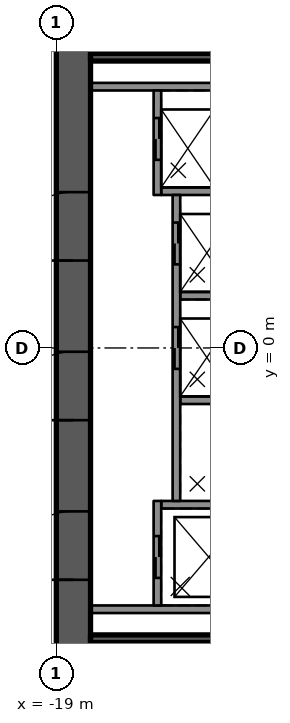
"""IFC4 building model, lengths in metres.
Left out: names, types, materials, properties, quantities, classifications, styles, units other than length and angle.
Written with IfcOpenShell. Run it as: python <this file> out.ifc"""

import sys

from ifc_helpers import new_model, si_unit, direction, frame, frame_2d, origin, place, context, subcontext, project, spatial, rectangle, extrude, element, fill, save


model = new_model("IFC4")
c1 = context("Model", 3, precision=1e-05, world=origin(), true_north=direction((0.0, 1.0)))
c2 = subcontext(c1, "Body", "Model", "MODEL_VIEW")
j1 = project(units=[si_unit("LENGTHUNIT", "METRE"), si_unit("PLANEANGLEUNIT", "RADIAN")], contexts=[c1])
p1 = place(None, origin())
s1 = spatial("IfcSite", under=j1, at=p1, CompositionType="ELEMENT")
p2 = place(p1, origin())
s2 = spatial("IfcBuilding", under=s1, at=p2, CompositionType="ELEMENT")
p3 = place(p2, frame((0.0, 0.0, 76.3)))
s3 = spatial("IfcBuildingStorey", under=s2, at=p3, CompositionType="ELEMENT", Elevation=76.3)
p4 = place(p3, frame((-18.55, -12.0, 0.0), z_axis=(0.0, 0.0, 1.0), x_axis=(0.0, 1.0, 0.0)))
e1 = element("IfcWall", 1, at=p4, inside=s3, PredefinedType="SHEAR", context=c2, shape_type="SweptSolid", body=[
    extrude(rectangle(XDim=24.0, YDim=0.9, at=frame_2d((12.0, 0.0))), origin(), (0.0, 0.0, 1.0), 4.4),
])
p5 = place(p4, frame((5.9, 0.0, 0.0)))
e2 = element("IfcOpeningElement", 2, at=p5, cuts=e1, PredefinedType="OPENING", context=c2, shape_type="SweptSolid", body=[
    extrude(rectangle(XDim=1.8, YDim=2.1, at=frame_2d((0.9, 1.05))), frame((0.0, 0.46, 0.0), z_axis=(0.0, -1.0, 0.0), x_axis=(1.0, 0.0, 0.0)), (0.0, 0.0, 1.0), 0.92),
])
p6 = place(p4, frame((10.1, 0.0, 0.0)))
e3 = element("IfcOpeningElement", 3, at=p6, cuts=e1, PredefinedType="OPENING", context=c2, shape_type="SweptSolid", body=[
    extrude(rectangle(XDim=1.8, YDim=2.1, at=frame_2d((0.9, 1.05))), frame((0.0, 0.46, 0.0), z_axis=(0.0, -1.0, 0.0), x_axis=(1.0, 0.0, 0.0)), (0.0, 0.0, 1.0), 0.92),
])
p7 = place(p4, frame((14.3, 0.0, 0.0)))
e4 = element("IfcOpeningElement", 4, at=p7, cuts=e1, PredefinedType="OPENING", context=c2, shape_type="SweptSolid", body=[
    extrude(rectangle(XDim=1.8, YDim=2.1, at=frame_2d((0.9, 1.05))), frame((0.0, 0.46, 0.0), z_axis=(0.0, -1.0, 0.0), x_axis=(1.0, 0.0, 0.0)), (0.0, 0.0, 1.0), 0.92),
])
for number, where, z_axis, x_axis in (
    (5, (-11.54, 6.875, 0.0), (0.0, 0.0, 1.0), (-1.0, 0.0, 0.0)),
    (6, (-11.54, -6.875, 0.0), (0.0, 0.0, 1.0), (-1.0, 0.0, 0.0)),
):
    element("IfcWall", number, at=place(p3, frame(where, z_axis=z_axis, x_axis=x_axis)), inside=s3, PredefinedType="SOLIDWALL", context=c2, shape_type="SweptSolid", body=[
        extrude(rectangle(XDim=6.56, YDim=0.2, at=frame_2d((3.28, 0.0))), origin(), (0.0, 0.0, 1.0), 3.99),
    ])
p8 = place(p3, frame((-11.54, -4.125, 0.0), z_axis=(0.0, 0.0, 1.0), x_axis=(-1.0, 0.0, 0.0)))
e7 = element("IfcWall", 7, at=p8, inside=s3, PredefinedType="SOLIDWALL", context=c2, shape_type="SweptSolid", body=[
    extrude(rectangle(XDim=4.7, YDim=0.2, at=frame_2d((2.35, 0.0))), origin(), (0.0, 0.0, 1.0), 3.99),
])
for number, where, z_axis, x_axis in (
    (8, (-11.54, -1.375, 0.0), (0.0, 0.0, 1.0), (-1.0, 0.0, 0.0)),
    (9, (-11.54, 1.375, 0.0), (0.0, 0.0, 1.0), (-1.0, 0.0, 0.0)),
):
    element("IfcWall", number, at=place(p3, frame(where, z_axis=z_axis, x_axis=x_axis)), inside=s3, PredefinedType="SOLIDWALL", context=c2, shape_type="SweptSolid", body=[
        extrude(rectangle(XDim=4.2, YDim=0.2, at=frame_2d((2.1, 0.0))), origin(), (0.0, 0.0, 1.0), 3.99),
    ])
p9 = place(p3, frame((-11.54, 4.125, 0.0), z_axis=(0.0, 0.0, 1.0), x_axis=(-1.0, 0.0, 0.0)))
e10 = element("IfcWall", 10, at=p9, inside=s3, PredefinedType="SOLIDWALL", context=c2, shape_type="SweptSolid", body=[
    extrude(rectangle(XDim=4.7, YDim=0.2, at=frame_2d((2.35, 0.0))), origin(), (0.0, 0.0, 1.0), 3.99),
])
p10 = place(p3, frame((-16.34, -6.775, 0.0), z_axis=(0.0, 0.0, 1.0), x_axis=(0.0, 1.0, 0.0)))
e11 = element("IfcWall", 11, at=p10, inside=s3, PredefinedType="SOLIDWALL", context=c2, shape_type="SweptSolid", body=[
    extrude(rectangle(XDim=2.75, YDim=0.2, at=frame_2d((1.375, 0.0))), origin(), (0.0, 0.0, 1.0), 3.99),
])
p11 = place(p10, frame((0.725, 0.0, 0.0)))
e12 = element("IfcOpeningElement", 12, at=p11, cuts=e11, PredefinedType="OPENING", context=c2, shape_type="SweptSolid", body=[
    extrude(rectangle(XDim=1.1, YDim=2.1, at=frame_2d((0.55, 1.05))), frame((0.0, 0.11, 0.0), z_axis=(0.0, -1.0, 0.0), x_axis=(1.0, 0.0, 0.0)), (0.0, 0.0, 1.0), 0.22),
])
p12 = place(p3, frame((-15.84, -4.025, 0.0), z_axis=(0.0, 0.0, 1.0), x_axis=(0.0, 1.0, 0.0)))
e13 = element("IfcWall", 13, at=p12, inside=s3, PredefinedType="SOLIDWALL", context=c2, shape_type="SweptSolid", body=[
    extrude(rectangle(XDim=8.05, YDim=0.2, at=frame_2d((4.025, 0.0))), origin(), (0.0, 0.0, 1.0), 3.99),
])
p13 = place(p12, frame((3.475, 0.0, 0.0)))
e14 = element("IfcOpeningElement", 14, at=p13, cuts=e13, PredefinedType="OPENING", context=c2, shape_type="SweptSolid", body=[
    extrude(rectangle(XDim=1.1, YDim=2.1, at=frame_2d((0.55, 1.05))), frame((0.0, 0.11, 0.0), z_axis=(0.0, -1.0, 0.0), x_axis=(1.0, 0.0, 0.0)), (0.0, 0.0, 1.0), 0.22),
])
p14 = place(p12, frame((6.225, 0.0, 0.0)))
e15 = element("IfcOpeningElement", 15, at=p14, cuts=e13, PredefinedType="OPENING", context=c2, shape_type="SweptSolid", body=[
    extrude(rectangle(XDim=1.1, YDim=2.1, at=frame_2d((0.55, 1.05))), frame((0.0, 0.11, 0.0), z_axis=(0.0, -1.0, 0.0), x_axis=(1.0, 0.0, 0.0)), (0.0, 0.0, 1.0), 0.22),
])
p15 = place(p3, frame((-16.34, 4.025, 0.0), z_axis=(0.0, 0.0, 1.0), x_axis=(0.0, 1.0, 0.0)))
e16 = element("IfcWall", 16, at=p15, inside=s3, PredefinedType="SOLIDWALL", context=c2, shape_type="SweptSolid", body=[
    extrude(rectangle(XDim=2.75, YDim=0.2, at=frame_2d((1.375, 0.0))), origin(), (0.0, 0.0, 1.0), 3.99),
])
p16 = place(p15, frame((0.925, 0.0, 0.0)))
e17 = element("IfcOpeningElement", 17, at=p16, cuts=e16, PredefinedType="OPENING", context=c2, shape_type="SweptSolid", body=[
    extrude(rectangle(XDim=1.1, YDim=2.1, at=frame_2d((0.55, 1.05))), frame((0.0, 0.11, 0.0), z_axis=(0.0, -1.0, 0.0), x_axis=(1.0, 0.0, 0.0)), (0.0, 0.0, 1.0), 0.22),
])
for number, where, z_axis, x_axis in (
    (18, (-11.54, 7.65, 0.0), (0.0, 0.0, 1.0), (-1.0, 0.0, 0.0)),
    (19, (-11.54, -7.65, 0.0), (0.0, 0.0, 1.0), (-1.0, 0.0, 0.0)),
):
    element("IfcWall", number, at=place(p3, frame(where, z_axis=z_axis, x_axis=x_axis)), inside=s3, PredefinedType="SOLIDWALL", context=c2, shape_type="SweptSolid", body=[
        extrude(rectangle(XDim=6.56, YDim=0.2, at=frame_2d((3.28, 0.0))), origin(), (0.0, 0.0, 1.0), 3.99),
    ])
p17 = place(p11, origin())
e20 = element("IfcDoor", 20, at=p17, inside=s3, OperationType="DOUBLE_DOOR_SLIDING", PredefinedType="DOOR", context=c2, shape_type="SweptSolid", body=[
    extrude(rectangle(XDim=1.1, YDim=2.1, at=frame_2d((0.55, 1.05))), frame((0.0, 0.025, 0.0), z_axis=(0.0, -1.0, 0.0), x_axis=(1.0, 0.0, 0.0)), (0.0, 0.0, 1.0), 0.05),
])
fill(e12, e20)
p18 = place(p13, origin())
e21 = element("IfcDoor", 21, at=p18, inside=s3, OperationType="DOUBLE_DOOR_SLIDING", PredefinedType="DOOR", context=c2, shape_type="SweptSolid", body=[
    extrude(rectangle(XDim=1.1, YDim=2.1, at=frame_2d((0.55, 1.05))), frame((0.0, 0.025, 0.0), z_axis=(0.0, -1.0, 0.0), x_axis=(1.0, 0.0, 0.0)), (0.0, 0.0, 1.0), 0.05),
])
fill(e14, e21)
p19 = place(p14, origin())
e22 = element("IfcDoor", 22, at=p19, inside=s3, OperationType="DOUBLE_DOOR_SLIDING", PredefinedType="DOOR", context=c2, shape_type="SweptSolid", body=[
    extrude(rectangle(XDim=1.1, YDim=2.1, at=frame_2d((0.55, 1.05))), frame((0.0, 0.025, 0.0), z_axis=(0.0, -1.0, 0.0), x_axis=(1.0, 0.0, 0.0)), (0.0, 0.0, 1.0), 0.05),
])
fill(e15, e22)
p20 = place(p16, origin())
e23 = element("IfcDoor", 23, at=p20, inside=s3, OperationType="DOUBLE_DOOR_SLIDING", PredefinedType="DOOR", context=c2, shape_type="SweptSolid", body=[
    extrude(rectangle(XDim=1.1, YDim=2.1, at=frame_2d((0.55, 1.05))), frame((0.0, 0.025, 0.0), z_axis=(0.0, -1.0, 0.0), x_axis=(1.0, 0.0, 0.0)), (0.0, 0.0, 1.0), 0.05),
])
fill(e17, e23)
p21 = place(p5, origin())
e24 = element("IfcDoor", 24, at=p21, inside=s3, OperationType="SINGLE_SWING_LEFT", PredefinedType="DOOR", context=c2, shape_type="SweptSolid", body=[
    extrude(rectangle(XDim=1.8, YDim=2.1, at=frame_2d((0.9, 1.05))), frame((0.0, 0.025, 0.0), z_axis=(0.0, -1.0, 0.0), x_axis=(1.0, 0.0, 0.0)), (0.0, 0.0, 1.0), 0.05),
])
fill(e2, e24)
p22 = place(p6, origin())
e25 = element("IfcDoor", 25, at=p22, inside=s3, OperationType="SINGLE_SWING_LEFT", PredefinedType="DOOR", context=c2, shape_type="SweptSolid", body=[
    extrude(rectangle(XDim=1.8, YDim=2.1, at=frame_2d((0.9, 1.05))), frame((0.0, 0.025, 0.0), z_axis=(0.0, -1.0, 0.0), x_axis=(1.0, 0.0, 0.0)), (0.0, 0.0, 1.0), 0.05),
])
fill(e3, e25)
p23 = place(p7, origin())
e26 = element("IfcDoor", 26, at=p23, inside=s3, OperationType="SINGLE_SWING_RIGHT", PredefinedType="DOOR", context=c2, shape_type="SweptSolid", body=[
    extrude(rectangle(XDim=1.8, YDim=2.1, at=frame_2d((0.9, 1.05))), frame((0.0, 0.025, 0.0), z_axis=(0.0, -1.0, 0.0), x_axis=(1.0, 0.0, 0.0)), (0.0, 0.0, 1.0), 0.05),
])
fill(e4, e26)
save(model, sys.argv[1])
